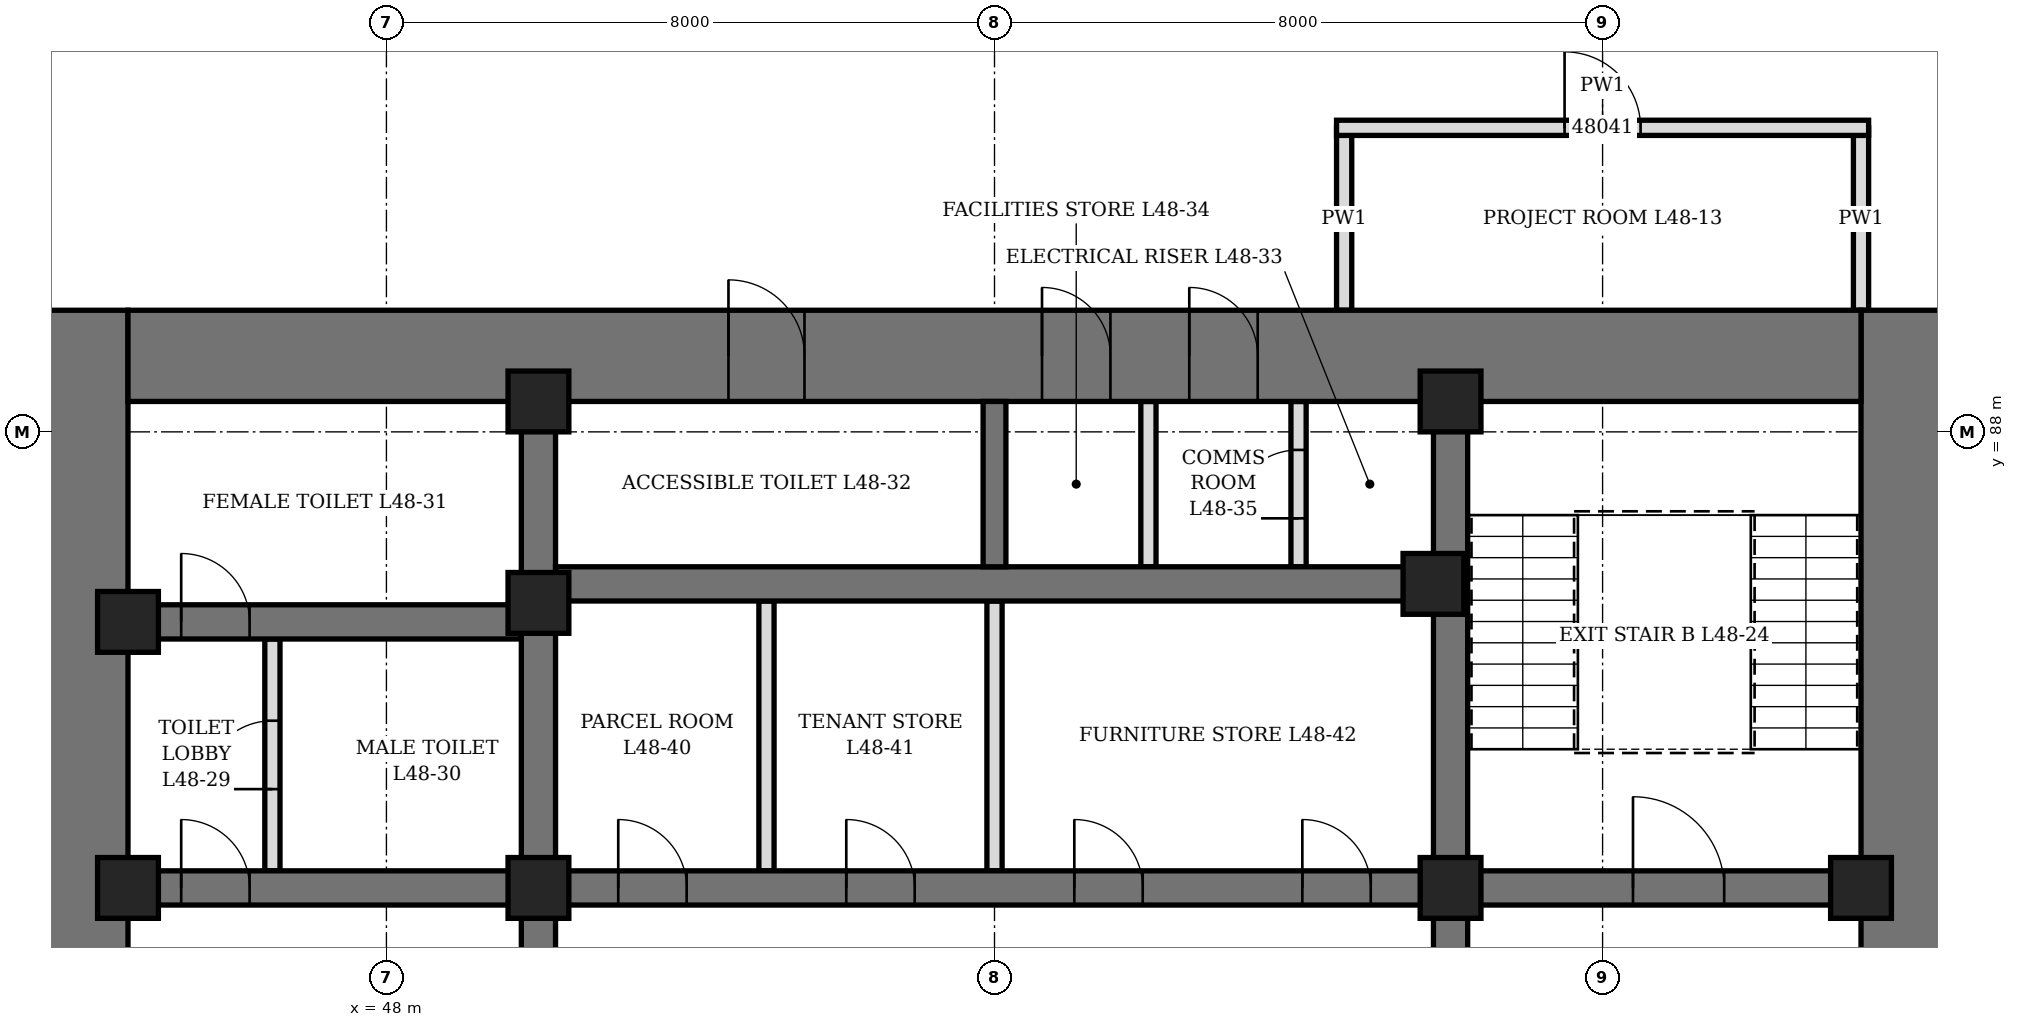
"""IFC4 building model, lengths in metres.
Left out: names, types, materials, properties, quantities, classifications, styles, units other than length and angle.
Written with IfcOpenShell. Run it as: python <this file> out.ifc"""

import sys

from ifc_helpers import new_model, si_unit, direction, frame, frame_2d, origin, origin_2d, place, context, subcontext, project, spatial, rectangle, hollow_rectangle, extrude, element, fill, save


model = new_model("IFC4")
c1 = context("Model", 3, precision=1e-05, world=origin(), true_north=direction((0.0, 1.0)))
c2 = subcontext(c1, "Body", "Model", "MODEL_VIEW")
j1 = project(units=[si_unit("LENGTHUNIT", "METRE"), si_unit("PLANEANGLEUNIT", "RADIAN")], contexts=[c1])
p1 = place(None, origin())
s1 = spatial("IfcSite", under=j1, at=p1, CompositionType="ELEMENT")
p2 = place(p1, origin())
s2 = spatial("IfcBuilding", under=s1, at=p2, CompositionType="ELEMENT")
p3 = place(p2, frame((0.0, 0.0, 214.9)))
s3 = spatial("IfcBuildingStorey", under=s2, at=p3, CompositionType="ELEMENT", Elevation=214.9)
p4 = place(p3, frame((44.0, 70.4, 0.0), z_axis=(0.0, 0.0, 1.0), x_axis=(0.0, 1.0, 0.0)))
e1 = element("IfcWall", 1, at=p4, inside=s3, PredefinedType="SHEAR", context=c2, shape_type="SweptSolid", body=[
    extrude(rectangle(XDim=19.2, YDim=1.2, at=frame_2d((9.6, 0.0))), origin(), (0.0, 0.0, 1.0), 4.2),
])
p5 = place(p4, frame((8.6, 0.0, 0.0)))
e2 = element("IfcOpeningElement", 2, at=p5, cuts=e1, PredefinedType="OPENING", context=c2, shape_type="SweptSolid", body=[
    extrude(rectangle(XDim=2.0, YDim=2.4, at=frame_2d((1.0, 1.2))), frame((0.0, 0.61, 0.0), z_axis=(0.0, -1.0, 0.0), x_axis=(1.0, 0.0, 0.0)), (0.0, 0.0, 1.0), 1.22),
])
p6 = place(p3, frame((68.0, 70.4, 0.0), z_axis=(0.0, 0.0, 1.0), x_axis=(0.0, 1.0, 0.0)))
e3 = element("IfcWall", 3, at=p6, inside=s3, PredefinedType="SHEAR", context=c2, shape_type="SweptSolid", body=[
    extrude(rectangle(XDim=19.2, YDim=1.2, at=frame_2d((9.6, 0.0))), origin(), (0.0, 0.0, 1.0), 4.2),
])
p7 = place(p6, frame((8.6, 0.0, 0.0)))
e4 = element("IfcOpeningElement", 4, at=p7, cuts=e3, PredefinedType="OPENING", context=c2, shape_type="SweptSolid", body=[
    extrude(rectangle(XDim=2.0, YDim=2.4, at=frame_2d((1.0, 1.2))), frame((0.0, 0.61, 0.0), z_axis=(0.0, -1.0, 0.0), x_axis=(1.0, 0.0, 0.0)), (0.0, 0.0, 1.0), 1.22),
])
p8 = place(p3, frame((44.6, 89.0, 0.0), z_axis=(0.0, 0.0, 1.0), x_axis=(1.0, 0.0, 0.0)))
e5 = element("IfcWall", 5, at=p8, inside=s3, PredefinedType="SHEAR", context=c2, shape_type="SweptSolid", body=[
    extrude(rectangle(XDim=22.8, YDim=1.2, at=frame_2d((11.4, 0.0))), origin(), (0.0, 0.0, 1.0), 4.2),
])
p9 = place(p8, frame((7.9, 0.0, 0.0)))
e6 = element("IfcOpeningElement", 6, at=p9, cuts=e5, PredefinedType="OPENING", context=c2, shape_type="SweptSolid", body=[
    extrude(rectangle(XDim=1.0, YDim=2.1, at=frame_2d((0.5, 1.05))), frame((0.0, 0.61, 0.0), z_axis=(0.0, -1.0, 0.0), x_axis=(1.0, 0.0, 0.0)), (0.0, 0.0, 1.0), 1.22),
])
p10 = place(p8, frame((12.025, 0.0, 0.0)))
e7 = element("IfcOpeningElement", 7, at=p10, cuts=e5, PredefinedType="OPENING", context=c2, shape_type="SweptSolid", body=[
    extrude(rectangle(XDim=0.9, YDim=2.1, at=frame_2d((0.45, 1.05))), frame((0.0, 0.61, 0.0), z_axis=(0.0, -1.0, 0.0), x_axis=(1.0, 0.0, 0.0)), (0.0, 0.0, 1.0), 1.22),
])
p11 = place(p8, frame((13.962, 0.0, 0.0)))
e8 = element("IfcOpeningElement", 8, at=p11, cuts=e5, PredefinedType="OPENING", context=c2, shape_type="SweptSolid", body=[
    extrude(rectangle(XDim=0.9, YDim=2.1, at=frame_2d((0.45, 1.05))), frame((0.0, 0.61, 0.0), z_axis=(0.0, -1.0, 0.0), x_axis=(1.0, 0.0, 0.0)), (0.0, 0.0, 1.0), 1.22),
])
p12 = place(p3, frame((50.0, 71.6, 0.0), z_axis=(0.0, 0.0, 1.0), x_axis=(0.0, 1.0, 0.0)))
e9 = element("IfcWall", 9, at=p12, inside=s3, PredefinedType="SHEAR", context=c2, shape_type="SweptSolid", body=[
    extrude(rectangle(XDim=16.8, YDim=0.45, at=frame_2d((8.4, 0.0))), origin(), (0.0, 0.0, 1.0), 4.2),
])
p13 = place(p12, frame((7.5, 0.0, 0.0)))
e10 = element("IfcOpeningElement", 10, at=p13, cuts=e9, PredefinedType="OPENING", context=c2, shape_type="SweptSolid", body=[
    extrude(rectangle(XDim=1.8, YDim=2.4, at=frame_2d((0.9, 1.2))), frame((0.0, 0.235, 0.0), z_axis=(0.0, -1.0, 0.0), x_axis=(1.0, 0.0, 0.0)), (0.0, 0.0, 1.0), 0.47),
])
p14 = place(p3, frame((62.0, 71.6, 0.0), z_axis=(0.0, 0.0, 1.0), x_axis=(0.0, 1.0, 0.0)))
e11 = element("IfcWall", 11, at=p14, inside=s3, PredefinedType="SHEAR", context=c2, shape_type="SweptSolid", body=[
    extrude(rectangle(XDim=16.8, YDim=0.45, at=frame_2d((8.4, 0.0))), origin(), (0.0, 0.0, 1.0), 4.2),
])
p15 = place(p14, frame((7.5, 0.0, 0.0)))
e12 = element("IfcOpeningElement", 12, at=p15, cuts=e11, PredefinedType="OPENING", context=c2, shape_type="SweptSolid", body=[
    extrude(rectangle(XDim=1.8, YDim=2.4, at=frame_2d((0.9, 1.2))), frame((0.0, 0.235, 0.0), z_axis=(0.0, -1.0, 0.0), x_axis=(1.0, 0.0, 0.0)), (0.0, 0.0, 1.0), 0.47),
])
p16 = place(p3, frame((44.6, 82.0, 0.0), z_axis=(0.0, 0.0, 1.0), x_axis=(1.0, 0.0, 0.0)))
e13 = element("IfcWall", 13, at=p16, inside=s3, PredefinedType="SHEAR", context=c2, shape_type="SweptSolid", body=[
    extrude(rectangle(XDim=5.175, YDim=0.45, at=frame_2d((2.587, 0.0))), origin(), (0.0, 0.0, 1.0), 4.2),
])
p17 = place(p16, frame((0.7, 0.0, 0.0)))
e14 = element("IfcOpeningElement", 14, at=p17, cuts=e13, PredefinedType="OPENING", context=c2, shape_type="SweptSolid", body=[
    extrude(rectangle(XDim=0.9, YDim=2.1, at=frame_2d((0.45, 1.05))), frame((0.0, 0.235, 0.0), z_axis=(0.0, -1.0, 0.0), x_axis=(1.0, 0.0, 0.0)), (0.0, 0.0, 1.0), 0.47),
])
p18 = place(p3, frame((44.6, 85.5, 0.0), z_axis=(0.0, 0.0, 1.0), x_axis=(1.0, 0.0, 0.0)))
e15 = element("IfcWall", 15, at=p18, inside=s3, PredefinedType="SHEAR", context=c2, shape_type="SweptSolid", body=[
    extrude(rectangle(XDim=5.175, YDim=0.45, at=frame_2d((2.587, 0.0))), origin(), (0.0, 0.0, 1.0), 4.2),
])
p19 = place(p18, frame((0.7, 0.0, 0.0)))
e16 = element("IfcOpeningElement", 16, at=p19, cuts=e15, PredefinedType="OPENING", context=c2, shape_type="SweptSolid", body=[
    extrude(rectangle(XDim=0.9, YDim=2.1, at=frame_2d((0.45, 1.05))), frame((0.0, 0.235, 0.0), z_axis=(0.0, -1.0, 0.0), x_axis=(1.0, 0.0, 0.0)), (0.0, 0.0, 1.0), 0.47),
])
p20 = place(p3, frame((62.225, 82.0, 0.0), z_axis=(0.0, 0.0, 1.0), x_axis=(1.0, 0.0, 0.0)))
e17 = element("IfcWall", 17, at=p20, inside=s3, PredefinedType="SHEAR", context=c2, shape_type="SweptSolid", body=[
    extrude(rectangle(XDim=5.175, YDim=0.45, at=frame_2d((2.587, 0.0))), origin(), (0.0, 0.0, 1.0), 4.2),
])
p21 = place(p20, frame((2.175, 0.0, 0.0)))
e18 = element("IfcOpeningElement", 18, at=p21, cuts=e17, PredefinedType="OPENING", context=c2, shape_type="SweptSolid", body=[
    extrude(rectangle(XDim=1.2, YDim=2.1, at=frame_2d((0.6, 1.05))), frame((0.0, 0.235, 0.0), z_axis=(0.0, -1.0, 0.0), x_axis=(1.0, 0.0, 0.0)), (0.0, 0.0, 1.0), 0.47),
])
p22 = place(p3, frame((50.225, 82.0, 0.0), z_axis=(0.0, 0.0, 1.0), x_axis=(1.0, 0.0, 0.0)))
e19 = element("IfcWall", 19, at=p22, inside=s3, PredefinedType="SHEAR", context=c2, shape_type="SweptSolid", body=[
    extrude(rectangle(XDim=11.55, YDim=0.45, at=frame_2d((5.775, 0.0))), origin(), (0.0, 0.0, 1.0), 4.2),
])
p23 = place(p22, frame((0.825, 0.0, 0.0)))
e20 = element("IfcOpeningElement", 20, at=p23, cuts=e19, PredefinedType="OPENING", context=c2, shape_type="SweptSolid", body=[
    extrude(rectangle(XDim=0.9, YDim=2.1, at=frame_2d((0.45, 1.05))), frame((0.0, 0.235, 0.0), z_axis=(0.0, -1.0, 0.0), x_axis=(1.0, 0.0, 0.0)), (0.0, 0.0, 1.0), 0.47),
])
p24 = place(p22, frame((3.825, 0.0, 0.0)))
e21 = element("IfcOpeningElement", 21, at=p24, cuts=e19, PredefinedType="OPENING", context=c2, shape_type="SweptSolid", body=[
    extrude(rectangle(XDim=0.9, YDim=2.1, at=frame_2d((0.45, 1.05))), frame((0.0, 0.235, 0.0), z_axis=(0.0, -1.0, 0.0), x_axis=(1.0, 0.0, 0.0)), (0.0, 0.0, 1.0), 0.47),
])
p25 = place(p22, frame((6.825, 0.0, 0.0)))
e22 = element("IfcOpeningElement", 22, at=p25, cuts=e19, PredefinedType="OPENING", context=c2, shape_type="SweptSolid", body=[
    extrude(rectangle(XDim=0.9, YDim=2.1, at=frame_2d((0.45, 1.05))), frame((0.0, 0.235, 0.0), z_axis=(0.0, -1.0, 0.0), x_axis=(1.0, 0.0, 0.0)), (0.0, 0.0, 1.0), 0.47),
])
p26 = place(p22, frame((9.825, 0.0, 0.0)))
e23 = element("IfcOpeningElement", 23, at=p26, cuts=e19, PredefinedType="OPENING", context=c2, shape_type="SweptSolid", body=[
    extrude(rectangle(XDim=0.9, YDim=2.1, at=frame_2d((0.45, 1.05))), frame((0.0, 0.235, 0.0), z_axis=(0.0, -1.0, 0.0), x_axis=(1.0, 0.0, 0.0)), (0.0, 0.0, 1.0), 0.47),
])
p27 = place(p3, frame((50.225, 86.0, 0.0), z_axis=(0.0, 0.0, 1.0), x_axis=(1.0, 0.0, 0.0)))
e24 = element("IfcWall", 24, at=p27, inside=s3, PredefinedType="SHEAR", context=c2, shape_type="SweptSolid", body=[
    extrude(rectangle(XDim=11.55, YDim=0.45, at=frame_2d((5.775, 0.0))), origin(), (0.0, 0.0, 1.0), 4.2),
])
p28 = place(p3, frame((56.0, 86.225, 0.0), z_axis=(0.0, 0.0, 1.0), x_axis=(0.0, 1.0, 0.0)))
e25 = element("IfcWall", 25, at=p28, inside=s3, PredefinedType="SHEAR", context=c2, shape_type="SweptSolid", body=[
    extrude(rectangle(XDim=2.175, YDim=0.3, at=frame_2d((1.087, 0.0))), origin(), (0.0, 0.0, 1.0), 4.2),
])
for number, where, z_axis, x_axis in (
    (26, (44.6, 82.0, 0.0), (0.0, 0.0, 1.0), (1.0, 0.0, 0.0)),
    (27, (44.6, 85.5, 0.0), (0.0, 0.0, 1.0), (1.0, 0.0, 0.0)),
    (28, (50.0, 82.0, 0.0), (0.0, 0.0, 1.0), (1.0, 0.0, 0.0)),
    (29, (50.0, 85.75, 0.0), (0.0, 0.0, 1.0), (1.0, 0.0, 0.0)),
    (30, (50.0, 88.4, 0.0), (0.0, 0.0, 1.0), (1.0, 0.0, 0.0)),
    (31, (61.775, 86.0, 0.0), (0.0, 0.0, 1.0), (1.0, 0.0, 0.0)),
    (32, (62.0, 82.0, 0.0), (0.0, 0.0, 1.0), (1.0, 0.0, 0.0)),
    (33, (62.0, 88.4, 0.0), (0.0, 0.0, 1.0), (1.0, 0.0, 0.0)),
    (34, (67.4, 82.0, 0.0), (0.0, 0.0, 1.0), (1.0, 0.0, 0.0)),
):
    element("IfcColumn", number, at=place(p3, frame(where, z_axis=z_axis, x_axis=x_axis)), inside=s3, PredefinedType="COLUMN", context=c2, shape_type="SweptSolid", body=[
        extrude(hollow_rectangle(XDim=0.8, YDim=0.8, WallThickness=0.1, at=origin_2d()), origin(), (0.0, 0.0, 1.0), 4.2),
    ])
p29 = place(p3, frame((46.5, 82.225, 0.0), z_axis=(0.0, 0.0, 1.0), x_axis=(0.0, 1.0, 0.0)))
e35 = element("IfcWall", 35, at=p29, inside=s3, PredefinedType="PARTITIONING", context=c2, shape_type="SweptSolid", body=[
    extrude(rectangle(XDim=3.05, YDim=0.2, at=frame_2d((1.525, 0.0))), origin(), (0.0, 0.0, 1.0), 4.04),
])
p30 = place(p29, frame((1.075, 0.0, 0.0)))
e36 = element("IfcOpeningElement", 36, at=p30, cuts=e35, PredefinedType="OPENING", context=c2, shape_type="SweptSolid", body=[
    extrude(rectangle(XDim=0.9, YDim=2.1, at=frame_2d((0.45, 1.05))), frame((0.0, 0.11, 0.0), z_axis=(0.0, -1.0, 0.0), x_axis=(1.0, 0.0, 0.0)), (0.0, 0.0, 1.0), 0.22),
])
p31 = place(p3, frame((60.0, 86.225, 0.0), z_axis=(0.0, 0.0, 1.0), x_axis=(0.0, 1.0, 0.0)))
e37 = element("IfcWall", 37, at=p31, inside=s3, PredefinedType="PARTITIONING", context=c2, shape_type="SweptSolid", body=[
    extrude(rectangle(XDim=2.175, YDim=0.2, at=frame_2d((1.087, 0.0))), origin(), (0.0, 0.0, 1.0), 4.04),
])
p32 = place(p31, frame((0.637, 0.0, 0.0)))
e38 = element("IfcOpeningElement", 38, at=p32, cuts=e37, PredefinedType="OPENING", context=c2, shape_type="SweptSolid", body=[
    extrude(rectangle(XDim=0.9, YDim=2.1, at=frame_2d((0.45, 1.05))), frame((0.0, 0.11, 0.0), z_axis=(0.0, -1.0, 0.0), x_axis=(1.0, 0.0, 0.0)), (0.0, 0.0, 1.0), 0.22),
])
p33 = place(p3, frame((58.025, 86.225, 0.0), z_axis=(0.0, 0.0, 1.0), x_axis=(0.0, 1.0, 0.0)))
e39 = element("IfcWall", 39, at=p33, inside=s3, PredefinedType="PARTITIONING", context=c2, shape_type="SweptSolid", body=[
    extrude(rectangle(XDim=2.175, YDim=0.2, at=frame_2d((1.087, 0.0))), origin(), (0.0, 0.0, 1.0), 4.04),
])
p34 = place(p3, frame((53.0, 82.225, 0.0), z_axis=(0.0, 0.0, 1.0), x_axis=(0.0, 1.0, 0.0)))
e40 = element("IfcWall", 40, at=p34, inside=s3, PredefinedType="PARTITIONING", context=c2, shape_type="SweptSolid", body=[
    extrude(rectangle(XDim=3.55, YDim=0.2, at=frame_2d((1.775, 0.0))), origin(), (0.0, 0.0, 1.0), 4.04),
])
p35 = place(p3, frame((56.0, 82.225, 0.0), z_axis=(0.0, 0.0, 1.0), x_axis=(0.0, 1.0, 0.0)))
e41 = element("IfcWall", 41, at=p35, inside=s3, PredefinedType="PARTITIONING", context=c2, shape_type="SweptSolid", body=[
    extrude(rectangle(XDim=3.55, YDim=0.2, at=frame_2d((1.775, 0.0))), origin(), (0.0, 0.0, 1.0), 3.14),
])
for number, where, z_axis, x_axis in (
    (42, (60.6, 89.6, 0.0), (0.0, 0.0, 1.0), (0.0, 1.0, 0.0)),
    (43, (67.4, 89.6, 0.0), (0.0, 0.0, 1.0), (0.0, 1.0, 0.0)),
):
    element("IfcWall", number, at=place(p3, frame(where, z_axis=z_axis, x_axis=x_axis)), inside=s3, PredefinedType="PARTITIONING", context=c2, shape_type="SweptSolid", body=[
        extrude(rectangle(XDim=2.4, YDim=0.2, at=frame_2d((1.2, 0.0))), origin(), (0.0, 0.0, 1.0), 4.04),
    ])
p36 = place(p3, frame((60.5, 92.0, 0.0), z_axis=(0.0, 0.0, 1.0), x_axis=(1.0, 0.0, 0.0)))
e44 = element("IfcWall", 44, at=p36, inside=s3, PredefinedType="PARTITIONING", context=c2, shape_type="SweptSolid", body=[
    extrude(rectangle(XDim=7.0, YDim=0.2, at=frame_2d((3.5, 0.0))), origin(), (0.0, 0.0, 1.0), 4.04),
])
p37 = place(p36, frame((3.0, 0.0, 0.0)))
e45 = element("IfcOpeningElement", 45, at=p37, cuts=e44, PredefinedType="OPENING", context=c2, shape_type="SweptSolid", body=[
    extrude(rectangle(XDim=1.0, YDim=2.1, at=frame_2d((0.5, 1.05))), frame((0.0, 0.11, 0.0), z_axis=(0.0, -1.0, 0.0), x_axis=(1.0, 0.0, 0.0)), (0.0, 0.0, 1.0), 0.22),
])
p38 = place(p17, origin())
e46 = element("IfcDoor", 46, at=p38, inside=s3, OperationType="SINGLE_SWING_LEFT", PredefinedType="DOOR", context=c2, shape_type="SweptSolid", body=[
    extrude(rectangle(XDim=0.9, YDim=2.1, at=frame_2d((0.45, 1.05))), frame((0.0, 0.225, 0.0), z_axis=(0.0, -1.0, 0.0), x_axis=(1.0, 0.0, 0.0)), (0.0, 0.0, 1.0), 0.449),
])
fill(e14, e46)
p39 = place(p30, origin())
e47 = element("IfcDoor", 47, at=p39, inside=s3, OperationType="SINGLE_SWING_RIGHT", PredefinedType="DOOR", context=c2, shape_type="SweptSolid", body=[
    extrude(rectangle(XDim=0.9, YDim=2.1, at=frame_2d((0.45, 1.05))), frame((0.0, 0.1, 0.0), z_axis=(0.0, -1.0, 0.0), x_axis=(1.0, 0.0, 0.0)), (0.0, 0.0, 1.0), 0.199),
])
fill(e36, e47)
p40 = place(p19, origin())
e48 = element("IfcDoor", 48, at=p40, inside=s3, OperationType="SINGLE_SWING_RIGHT", PredefinedType="DOOR", context=c2, shape_type="SweptSolid", body=[
    extrude(rectangle(XDim=0.9, YDim=2.1, at=frame_2d((0.45, 1.05))), frame((0.0, 0.225, 0.0), z_axis=(0.0, -1.0, 0.0), x_axis=(1.0, 0.0, 0.0)), (0.0, 0.0, 1.0), 0.449),
])
fill(e16, e48)
p41 = place(p9, origin())
e49 = element("IfcDoor", 49, at=p41, inside=s3, OperationType="SINGLE_SWING_LEFT", PredefinedType="DOOR", context=c2, shape_type="SweptSolid", body=[
    extrude(rectangle(XDim=1.0, YDim=2.1, at=frame_2d((0.5, 1.05))), frame((0.0, 0.35, 0.0), z_axis=(0.0, -1.0, 0.0), x_axis=(1.0, 0.0, 0.0)), (0.0, 0.0, 1.0), 0.7),
])
fill(e6, e49)
p42 = place(p10, origin())
e50 = element("IfcDoor", 50, at=p42, inside=s3, OperationType="SINGLE_SWING_LEFT", PredefinedType="DOOR", context=c2, shape_type="SweptSolid", body=[
    extrude(rectangle(XDim=0.9, YDim=2.1, at=frame_2d((0.45, 1.05))), frame((0.0, 0.35, 0.0), z_axis=(0.0, -1.0, 0.0), x_axis=(1.0, 0.0, 0.0)), (0.0, 0.0, 1.0), 0.7),
])
fill(e7, e50)
p43 = place(p11, origin())
e51 = element("IfcDoor", 51, at=p43, inside=s3, OperationType="SINGLE_SWING_LEFT", PredefinedType="DOOR", context=c2, shape_type="SweptSolid", body=[
    extrude(rectangle(XDim=0.9, YDim=2.1, at=frame_2d((0.45, 1.05))), frame((0.0, 0.35, 0.0), z_axis=(0.0, -1.0, 0.0), x_axis=(1.0, 0.0, 0.0)), (0.0, 0.0, 1.0), 0.7),
])
fill(e8, e51)
p44 = place(p32, origin())
e52 = element("IfcDoor", 52, at=p44, inside=s3, OperationType="SINGLE_SWING_LEFT", PredefinedType="DOOR", context=c2, shape_type="SweptSolid", body=[
    extrude(rectangle(XDim=0.9, YDim=2.1, at=frame_2d((0.45, 1.05))), frame((0.0, 0.1, 0.0), z_axis=(0.0, -1.0, 0.0), x_axis=(1.0, 0.0, 0.0)), (0.0, 0.0, 1.0), 0.199),
])
fill(e38, e52)
p45 = place(p23, origin())
e53 = element("IfcDoor", 53, at=p45, inside=s3, OperationType="SINGLE_SWING_LEFT", PredefinedType="DOOR", context=c2, shape_type="SweptSolid", body=[
    extrude(rectangle(XDim=0.9, YDim=2.1, at=frame_2d((0.45, 1.05))), frame((0.0, 0.225, 0.0), z_axis=(0.0, -1.0, 0.0), x_axis=(1.0, 0.0, 0.0)), (0.0, 0.0, 1.0), 0.449),
])
fill(e20, e53)
p46 = place(p24, origin())
e54 = element("IfcDoor", 54, at=p46, inside=s3, OperationType="SINGLE_SWING_LEFT", PredefinedType="DOOR", context=c2, shape_type="SweptSolid", body=[
    extrude(rectangle(XDim=0.9, YDim=2.1, at=frame_2d((0.45, 1.05))), frame((0.0, 0.225, 0.0), z_axis=(0.0, -1.0, 0.0), x_axis=(1.0, 0.0, 0.0)), (0.0, 0.0, 1.0), 0.449),
])
fill(e21, e54)
p47 = place(p25, origin())
e55 = element("IfcDoor", 55, at=p47, inside=s3, OperationType="SINGLE_SWING_LEFT", PredefinedType="DOOR", context=c2, shape_type="SweptSolid", body=[
    extrude(rectangle(XDim=0.9, YDim=2.1, at=frame_2d((0.45, 1.05))), frame((0.0, 0.225, 0.0), z_axis=(0.0, -1.0, 0.0), x_axis=(1.0, 0.0, 0.0)), (0.0, 0.0, 1.0), 0.449),
])
fill(e22, e55)
p48 = place(p26, origin())
e56 = element("IfcDoor", 56, at=p48, inside=s3, OperationType="SINGLE_SWING_LEFT", PredefinedType="DOOR", context=c2, shape_type="SweptSolid", body=[
    extrude(rectangle(XDim=0.9, YDim=2.1, at=frame_2d((0.45, 1.05))), frame((0.0, 0.225, 0.0), z_axis=(0.0, -1.0, 0.0), x_axis=(1.0, 0.0, 0.0)), (0.0, 0.0, 1.0), 0.449),
])
fill(e23, e56)
p49 = place(p21, origin())
e57 = element("IfcDoor", 57, at=p49, inside=s3, OperationType="SINGLE_SWING_LEFT", PredefinedType="DOOR", context=c2, shape_type="SweptSolid", body=[
    extrude(rectangle(XDim=1.2, YDim=2.1, at=frame_2d((0.6, 1.05))), frame((0.0, 0.225, 0.0), z_axis=(0.0, -1.0, 0.0), x_axis=(1.0, 0.0, 0.0)), (0.0, 0.0, 1.0), 0.449),
])
fill(e18, e57)
p50 = place(p37, origin())
e58 = element("IfcDoor", 58, at=p50, inside=s3, OperationType="SINGLE_SWING_LEFT", PredefinedType="DOOR", context=c2, shape_type="SweptSolid", body=[
    extrude(rectangle(XDim=1.0, YDim=2.1, at=frame_2d((0.5, 1.05))), frame((0.0, 0.1, 0.0), z_axis=(0.0, -1.0, 0.0), x_axis=(1.0, 0.0, 0.0)), (0.0, 0.0, 1.0), 0.199),
])
fill(e45, e58)
save(model, sys.argv[1])
